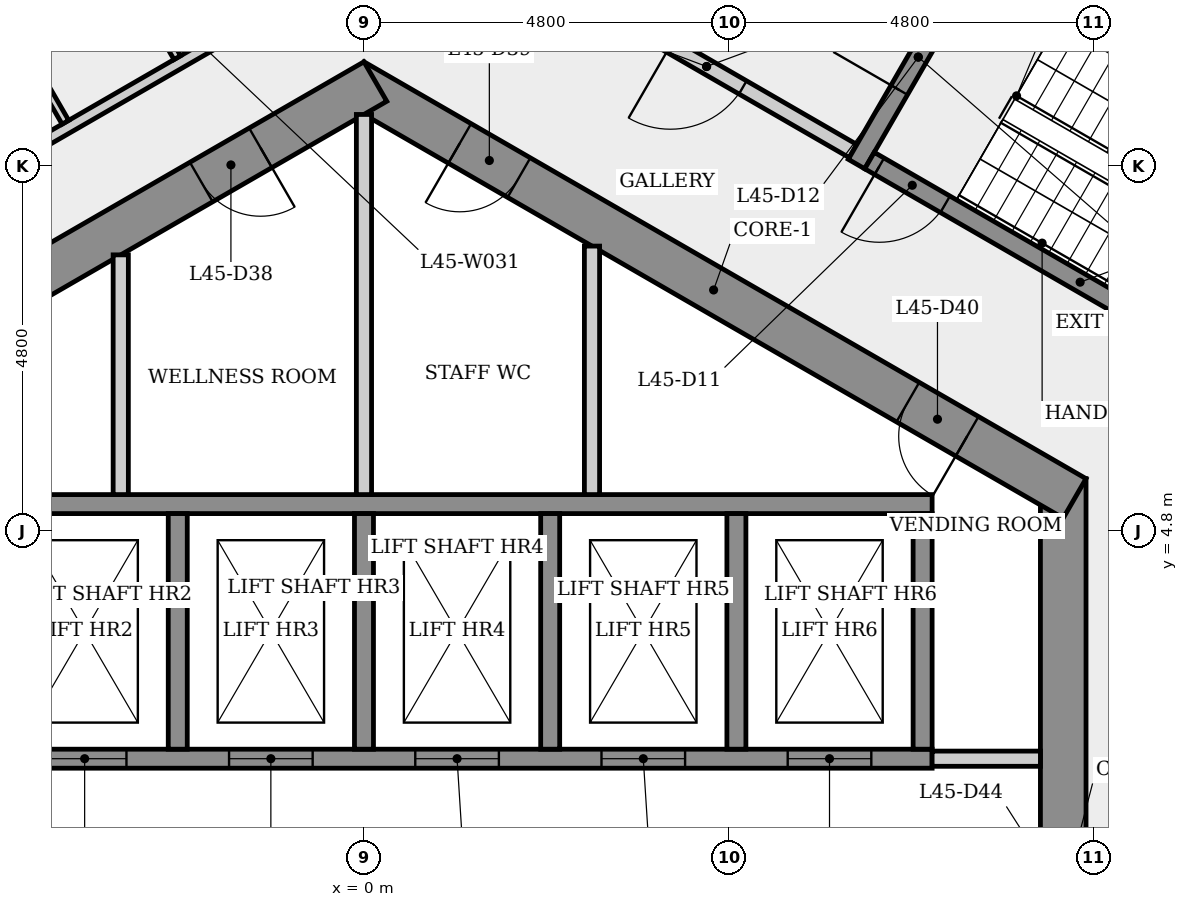
"""IFC4 building model, lengths in metres.
Left out: names, types, materials, properties, quantities, classifications, styles, units other than length and angle.
Written with IfcOpenShell. Run it as: python <this file> out.ifc"""

import sys

from ifc_helpers import new_model, si_unit, direction, frame, frame_2d, origin, place, context, subcontext, project, spatial, rectangle, extrude, element, fill, save


model = new_model("IFC4")
c1 = context("Model", 3, precision=1e-05, world=origin(), true_north=direction((0.0, 1.0)))
c2 = subcontext(c1, "Body", "Model", "MODEL_VIEW")
j1 = project(units=[si_unit("LENGTHUNIT", "METRE"), si_unit("PLANEANGLEUNIT", "RADIAN")], contexts=[c1])
p1 = place(None, origin())
s1 = spatial("IfcSite", under=j1, at=p1, CompositionType="ELEMENT")
p2 = place(p1, origin())
s2 = spatial("IfcBuilding", under=s1, at=p2, CompositionType="ELEMENT")
p3 = place(p2, frame((0.0, 0.0, 169.7)))
s3 = spatial("IfcBuildingStorey", under=s2, at=p3, CompositionType="ELEMENT", Elevation=169.7)
p4 = place(p3, frame((9.2, -5.485, 0.0), z_axis=(0.0, 0.0, 1.0), x_axis=(0.0, 1.0, 0.0)))
e1 = element("IfcWall", 1, at=p4, inside=s3, PredefinedType="SHEAR", context=c2, shape_type="SweptSolid", body=[
    extrude(rectangle(XDim=10.97, YDim=0.6, at=frame_2d((5.485, 0.0))), origin(), (0.0, 0.0, 1.0), 3.4),
])
p5 = place(p4, frame((4.685, 0.0, 0.0)))
e2 = element("IfcOpeningElement", 2, at=p5, cuts=e1, PredefinedType="OPENING", context=c2, shape_type="SweptSolid", body=[
    extrude(rectangle(XDim=1.6, YDim=2.1, at=frame_2d((0.8, 1.05))), frame((0.0, 0.31, 0.0), z_axis=(0.0, -1.0, 0.0), x_axis=(1.0, 0.0, 0.0)), (0.0, 0.0, 1.0), 0.62),
])
p6 = place(p3, frame((9.35, 5.225, 0.0), z_axis=(0.0, 0.0, 1.0), x_axis=(-0.866023993627, 0.500002442456, 0.0)))
e3 = element("IfcWall", 3, at=p6, inside=s3, PredefinedType="SHEAR", context=c2, shape_type="SweptSolid", body=[
    extrude(rectangle(XDim=10.97, YDim=0.6, at=frame_2d((5.485, 0.0))), origin(), (0.0, 0.0, 1.0), 3.4),
])
p7 = place(p6, frame((8.442, 0.0, 0.0)))
e4 = element("IfcOpeningElement", 4, at=p7, cuts=e3, PredefinedType="OPENING", context=c2, shape_type="SweptSolid", body=[
    extrude(rectangle(XDim=0.9, YDim=2.1, at=frame_2d((0.45, 1.05))), frame((0.0, 0.31, 0.0), z_axis=(0.0, -1.0, 0.0), x_axis=(1.0, 0.0, 0.0)), (0.0, 0.0, 1.0), 0.62),
])
p8 = place(p6, frame((1.634, 0.0, 0.0)))
e5 = element("IfcOpeningElement", 5, at=p8, cuts=e3, PredefinedType="OPENING", context=c2, shape_type="SweptSolid", body=[
    extrude(rectangle(XDim=0.9, YDim=2.1, at=frame_2d((0.45, 1.05))), frame((0.0, 0.31, 0.0), z_axis=(0.0, -1.0, 0.0), x_axis=(1.0, 0.0, 0.0)), (0.0, 0.0, 1.0), 0.62),
])
p9 = place(p3, frame((0.15, 10.71, 0.0), z_axis=(0.0, 0.0, 1.0), x_axis=(-0.866023993627, -0.500002442456, 0.0)))
e6 = element("IfcWall", 6, at=p9, inside=s3, PredefinedType="SHEAR", context=c2, shape_type="SweptSolid", body=[
    extrude(rectangle(XDim=10.97, YDim=0.6, at=frame_2d((5.485, 0.0))), origin(), (0.0, 0.0, 1.0), 3.4),
])
p10 = place(p9, frame((9.201, 0.0, 0.0)))
e7 = element("IfcOpeningElement", 7, at=p10, cuts=e6, PredefinedType="OPENING", context=c2, shape_type="SweptSolid", body=[
    extrude(rectangle(XDim=0.9, YDim=2.1, at=frame_2d((0.45, 1.05))), frame((0.0, 0.31, 0.0), z_axis=(0.0, -1.0, 0.0), x_axis=(1.0, 0.0, 0.0)), (0.0, 0.0, 1.0), 0.62),
])
p11 = place(p9, frame((1.744, 0.0, 0.0)))
e8 = element("IfcOpeningElement", 8, at=p11, cuts=e6, PredefinedType="OPENING", context=c2, shape_type="SweptSolid", body=[
    extrude(rectangle(XDim=0.9, YDim=2.1, at=frame_2d((0.45, 1.05))), frame((0.0, 0.31, 0.0), z_axis=(0.0, -1.0, 0.0), x_axis=(1.0, 0.0, 0.0)), (0.0, 0.0, 1.0), 0.62),
])
p12 = place(p3, frame((-9.663, 6.776, 0.0), z_axis=(0.0, 0.0, 1.0), x_axis=(0.866026375365, 0.499998317169, 0.0)))
e9 = element("IfcWall", 9, at=p12, inside=s3, PredefinedType="PARTITIONING", context=c2, shape_type="SweptSolid", body=[
    extrude(rectangle(XDim=10.036, YDim=0.15, at=frame_2d((5.018, 0.0))), origin(), (0.0, 0.0, 1.0), 3.05),
])
p13 = place(p12, frame((2.818, 0.0, 0.0)))
e10 = element("IfcOpeningElement", 10, at=p13, cuts=e9, PredefinedType="OPENING", context=c2, shape_type="SweptSolid", body=[
    extrude(rectangle(XDim=1.0, YDim=2.1, at=frame_2d((0.5, 1.05))), frame((0.0, 0.085, 0.0), z_axis=(0.0, -1.0, 0.0), x_axis=(1.0, 0.0, 0.0)), (0.0, 0.0, 1.0), 0.17),
])
p14 = place(p3, frame((-7.475, 1.8, 0.0), z_axis=(0.0, 0.0, 1.0), x_axis=(1.0, 0.0, 0.0)))
e11 = element("IfcWall", 11, at=p14, inside=s3, PredefinedType="SHEAR", context=c2, shape_type="SweptSolid", body=[
    extrude(rectangle(XDim=14.95, YDim=0.25, at=frame_2d((7.475, 0.0))), origin(), (0.0, 0.0, 1.0), 3.05),
])
p15 = place(p14, frame((0.8, 0.0, 0.0)))
e12 = element("IfcOpeningElement", 12, at=p15, cuts=e11, PredefinedType="OPENING", context=c2, shape_type="SweptSolid", body=[
    extrude(rectangle(XDim=1.1, YDim=2.1, at=frame_2d((0.55, 1.05))), frame((0.0, 0.135, 0.0), z_axis=(0.0, -1.0, 0.0), x_axis=(1.0, 0.0, 0.0)), (0.0, 0.0, 1.0), 0.27),
])
p16 = place(p14, frame((3.25, 0.0, 0.0)))
e13 = element("IfcOpeningElement", 13, at=p16, cuts=e11, PredefinedType="OPENING", context=c2, shape_type="SweptSolid", body=[
    extrude(rectangle(XDim=1.1, YDim=2.1, at=frame_2d((0.55, 1.05))), frame((0.0, 0.135, 0.0), z_axis=(0.0, -1.0, 0.0), x_axis=(1.0, 0.0, 0.0)), (0.0, 0.0, 1.0), 0.27),
])
p17 = place(p14, frame((5.7, 0.0, 0.0)))
e14 = element("IfcOpeningElement", 14, at=p17, cuts=e11, PredefinedType="OPENING", context=c2, shape_type="SweptSolid", body=[
    extrude(rectangle(XDim=1.1, YDim=2.1, at=frame_2d((0.55, 1.05))), frame((0.0, 0.135, 0.0), z_axis=(0.0, -1.0, 0.0), x_axis=(1.0, 0.0, 0.0)), (0.0, 0.0, 1.0), 0.27),
])
p18 = place(p14, frame((8.15, 0.0, 0.0)))
e15 = element("IfcOpeningElement", 15, at=p18, cuts=e11, PredefinedType="OPENING", context=c2, shape_type="SweptSolid", body=[
    extrude(rectangle(XDim=1.1, YDim=2.1, at=frame_2d((0.55, 1.05))), frame((0.0, 0.135, 0.0), z_axis=(0.0, -1.0, 0.0), x_axis=(1.0, 0.0, 0.0)), (0.0, 0.0, 1.0), 0.27),
])
p19 = place(p14, frame((10.6, 0.0, 0.0)))
e16 = element("IfcOpeningElement", 16, at=p19, cuts=e11, PredefinedType="OPENING", context=c2, shape_type="SweptSolid", body=[
    extrude(rectangle(XDim=1.1, YDim=2.1, at=frame_2d((0.55, 1.05))), frame((0.0, 0.135, 0.0), z_axis=(0.0, -1.0, 0.0), x_axis=(1.0, 0.0, 0.0)), (0.0, 0.0, 1.0), 0.27),
])
p20 = place(p14, frame((13.05, 0.0, 0.0)))
e17 = element("IfcOpeningElement", 17, at=p20, cuts=e11, PredefinedType="OPENING", context=c2, shape_type="SweptSolid", body=[
    extrude(rectangle(XDim=1.1, YDim=2.1, at=frame_2d((0.55, 1.05))), frame((0.0, 0.135, 0.0), z_axis=(0.0, -1.0, 0.0), x_axis=(1.0, 0.0, 0.0)), (0.0, 0.0, 1.0), 0.27),
])
p21 = place(p3, frame((-7.225, 5.15, 0.0), z_axis=(0.0, 0.0, 1.0), x_axis=(1.0, 0.0, 0.0)))
e18 = element("IfcWall", 18, at=p21, inside=s3, PredefinedType="SHEAR", context=c2, shape_type="SweptSolid", body=[
    extrude(rectangle(XDim=14.7, YDim=0.25, at=frame_2d((7.35, 0.0))), origin(), (0.0, 0.0, 1.0), 3.05),
])
p22 = place(p3, frame((-3.928, 10.174, 0.0), z_axis=(0.0, 0.0, 1.0), x_axis=(-0.500011399757, 0.866018822032, 0.0)))
e19 = element("IfcWall", 19, at=p22, inside=s3, PredefinedType="PARTITIONING", context=c2, shape_type="SweptSolid", body=[
    extrude(rectangle(XDim=7.411, YDim=0.1, at=frame_2d((3.706, 0.0))), origin(), (0.0, 0.0, 1.0), 3.05),
])
p23 = place(p3, frame((-3.644, 13.081, 0.0), z_axis=(0.0, 0.0, 1.0), x_axis=(0.499986429846, -0.866033238375, 0.0)))
e20 = element("IfcWall", 20, at=p23, inside=s3, PredefinedType="PARTITIONING", context=c2, shape_type="SweptSolid", body=[
    extrude(rectangle(XDim=2.375, YDim=0.1, at=frame_2d((1.188, 0.0))), origin(), (0.0, 0.0, 1.0), 3.05),
])
p24 = place(p23, frame((0.812, 0.0, 0.0)))
e21 = element("IfcOpeningElement", 21, at=p24, cuts=e20, PredefinedType="OPENING", context=c2, shape_type="SweptSolid", body=[
    extrude(rectangle(XDim=0.8, YDim=2.1, at=frame_2d((0.4, 1.05))), frame((0.0, 0.06, 0.0), z_axis=(0.0, -1.0, 0.0), x_axis=(1.0, 0.0, 0.0)), (0.0, 0.0, 1.0), 0.12),
])
p25 = place(p3, frame((-3.2, 8.429, 0.0), z_axis=(0.0, 0.0, 1.0), x_axis=(0.0, -1.0, 0.0)))
e22 = element("IfcWall", 22, at=p25, inside=s3, PredefinedType="PARTITIONING", context=c2, shape_type="SweptSolid", body=[
    extrude(rectangle(XDim=3.154, YDim=0.2, at=frame_2d((1.577, 0.0))), origin(), (0.0, 0.0, 1.0), 3.05),
])
for number, where, z_axis, x_axis in (
    (23, (-2.45, 5.025, 0.0), (0.0, 0.0, 1.0), (0.0, -1.0, 0.0)),
    (24, (0.0, 5.025, 0.0), (0.0, 0.0, 1.0), (0.0, -1.0, 0.0)),
):
    element("IfcWall", number, at=place(p3, frame(where, z_axis=z_axis, x_axis=x_axis)), inside=s3, PredefinedType="SHEAR", context=c2, shape_type="SweptSolid", body=[
        extrude(rectangle(XDim=3.1, YDim=0.25, at=frame_2d((1.55, 0.0))), origin(), (0.0, 0.0, 1.0), 3.4),
    ])
p26 = place(p3, frame((0.0, 10.277, 0.0), z_axis=(0.0, 0.0, 1.0), x_axis=(0.0, -1.0, 0.0)))
e25 = element("IfcWall", 25, at=p26, inside=s3, PredefinedType="PARTITIONING", context=c2, shape_type="SweptSolid", body=[
    extrude(rectangle(XDim=5.002, YDim=0.2, at=frame_2d((2.501, 0.0))), origin(), (0.0, 0.0, 1.0), 3.05),
])
p27 = place(p3, frame((2.45, 5.025, 0.0), z_axis=(0.0, 0.0, 1.0), x_axis=(0.0, -1.0, 0.0)))
e26 = element("IfcWall", 26, at=p27, inside=s3, PredefinedType="SHEAR", context=c2, shape_type="SweptSolid", body=[
    extrude(rectangle(XDim=3.1, YDim=0.25, at=frame_2d((1.55, 0.0))), origin(), (0.0, 0.0, 1.0), 3.4),
])
p28 = place(p3, frame((3.0, 8.545, 0.0), z_axis=(0.0, 0.0, 1.0), x_axis=(0.0, -1.0, 0.0)))
e27 = element("IfcWall", 27, at=p28, inside=s3, PredefinedType="PARTITIONING", context=c2, shape_type="SweptSolid", body=[
    extrude(rectangle(XDim=3.27, YDim=0.2, at=frame_2d((1.635, 0.0))), origin(), (0.0, 0.0, 1.0), 3.05),
])
p29 = place(p3, frame((4.9, 5.025, 0.0), z_axis=(0.0, 0.0, 1.0), x_axis=(0.0, -1.0, 0.0)))
e28 = element("IfcWall", 28, at=p29, inside=s3, PredefinedType="SHEAR", context=c2, shape_type="SweptSolid", body=[
    extrude(rectangle(XDim=3.1, YDim=0.25, at=frame_2d((1.55, 0.0))), origin(), (0.0, 0.0, 1.0), 3.4),
])
p30 = place(p3, frame((6.435, 9.795, 0.0), z_axis=(0.0, 0.0, 1.0), x_axis=(-0.866012907634, 0.500021643343, 0.0)))
e29 = element("IfcWall", 29, at=p30, inside=s3, PredefinedType="PARTITIONING", context=c2, shape_type="SweptSolid", body=[
    extrude(rectangle(XDim=4.45, YDim=0.2, at=frame_2d((2.225, 0.0))), origin(), (0.0, 0.0, 1.0), 3.05),
])
p31 = place(p30, frame((1.675, 0.0, 0.0)))
e30 = element("IfcOpeningElement", 30, at=p31, cuts=e29, PredefinedType="OPENING", context=c2, shape_type="SweptSolid", body=[
    extrude(rectangle(XDim=1.1, YDim=2.1, at=frame_2d((0.55, 1.05))), frame((0.0, 0.11, 0.0), z_axis=(0.0, -1.0, 0.0), x_axis=(1.0, 0.0, 0.0)), (0.0, 0.0, 1.0), 0.22),
])
p32 = place(p3, frame((6.48, 9.624, 0.0), z_axis=(0.0, 0.0, 1.0), x_axis=(0.500017246033, 0.866015446554, 0.0)))
e31 = element("IfcWall", 31, at=p32, inside=s3, PredefinedType="SHEAR", context=c2, shape_type="SweptSolid", body=[
    extrude(rectangle(XDim=3.25, YDim=0.25, at=frame_2d((1.625, 0.0))), origin(), (0.0, 0.0, 1.0), 3.05),
])
p33 = place(p32, frame((1.125, 0.0, 0.0)))
e32 = element("IfcOpeningElement", 32, at=p33, cuts=e31, PredefinedType="OPENING", context=c2, shape_type="SweptSolid", body=[
    extrude(rectangle(XDim=1.0, YDim=2.1, at=frame_2d((0.5, 1.05))), frame((0.0, 0.135, 0.0), z_axis=(0.0, -1.0, 0.0), x_axis=(1.0, 0.0, 0.0)), (0.0, 0.0, 1.0), 0.27),
])
p34 = place(p3, frame((7.475, 1.8, 0.0), z_axis=(0.0, 0.0, 1.0), x_axis=(1.0, 0.0, 0.0)))
e33 = element("IfcWall", 33, at=p34, inside=s3, PredefinedType="PARTITIONING", context=c2, shape_type="SweptSolid", body=[
    extrude(rectangle(XDim=1.425, YDim=0.2, at=frame_2d((0.712, 0.0))), origin(), (0.0, 0.0, 1.0), 3.05),
])
p35 = place(p3, frame((7.35, 5.025, 0.0), z_axis=(0.0, 0.0, 1.0), x_axis=(0.0, -1.0, 0.0)))
e34 = element("IfcWall", 34, at=p35, inside=s3, PredefinedType="SHEAR", context=c2, shape_type="SweptSolid", body=[
    extrude(rectangle(XDim=3.1, YDim=0.25, at=frame_2d((1.55, 0.0))), origin(), (0.0, 0.0, 1.0), 3.4),
])
p36 = place(p3, frame((8.151, 12.268, 0.0), z_axis=(0.0, 0.0, 1.0), x_axis=(0.866025499775, -0.499999833739, 0.0)))
e35 = element("IfcWall", 35, at=p36, inside=s3, PredefinedType="SHEAR", context=c2, shape_type="SweptSolid", body=[
    extrude(rectangle(XDim=6.4, YDim=0.25, at=frame_2d((3.2, 0.0))), origin(), (0.0, 0.0, 1.0), 3.05),
])
p37 = place(p3, frame((12.194, 6.47, 0.0), z_axis=(0.0, 0.0, 1.0), x_axis=(-0.866025499775, 0.499999833739, 0.0)))
e36 = element("IfcWall", 36, at=p37, inside=s3, PredefinedType="SHEAR", context=c2, shape_type="SweptSolid", body=[
    extrude(rectangle(XDim=6.4, YDim=0.25, at=frame_2d((3.2, 0.0))), origin(), (0.0, 0.0, 1.0), 3.05),
])
p38 = place(p37, frame((5.25, 0.0, 0.0)))
e37 = element("IfcOpeningElement", 37, at=p38, cuts=e36, PredefinedType="OPENING", context=c2, shape_type="SweptSolid", body=[
    extrude(rectangle(XDim=1.0, YDim=2.1, at=frame_2d((0.5, 1.05))), frame((0.0, 0.135, 0.0), z_axis=(0.0, -1.0, 0.0), x_axis=(1.0, 0.0, 0.0)), (0.0, 0.0, 1.0), 0.27),
])
p39 = place(p16, origin())
e38 = element("IfcDoor", 38, at=p39, inside=s3, OperationType="SLIDING_TO_LEFT", PredefinedType="DOOR", context=c2, shape_type="SweptSolid", body=[
    extrude(rectangle(XDim=1.1, YDim=2.1, at=frame_2d((0.55, 1.05))), frame((0.0, 0.025, 0.0), z_axis=(0.0, -1.0, 0.0), x_axis=(1.0, 0.0, 0.0)), (0.0, 0.0, 1.0), 0.05),
])
fill(e13, e38)
p40 = place(p17, origin())
e39 = element("IfcDoor", 39, at=p40, inside=s3, OperationType="SLIDING_TO_LEFT", PredefinedType="DOOR", context=c2, shape_type="SweptSolid", body=[
    extrude(rectangle(XDim=1.1, YDim=2.1, at=frame_2d((0.55, 1.05))), frame((0.0, 0.025, 0.0), z_axis=(0.0, -1.0, 0.0), x_axis=(1.0, 0.0, 0.0)), (0.0, 0.0, 1.0), 0.05),
])
fill(e14, e39)
p41 = place(p18, origin())
e40 = element("IfcDoor", 40, at=p41, inside=s3, OperationType="SLIDING_TO_LEFT", PredefinedType="DOOR", context=c2, shape_type="SweptSolid", body=[
    extrude(rectangle(XDim=1.1, YDim=2.1, at=frame_2d((0.55, 1.05))), frame((0.0, 0.025, 0.0), z_axis=(0.0, -1.0, 0.0), x_axis=(1.0, 0.0, 0.0)), (0.0, 0.0, 1.0), 0.05),
])
fill(e15, e40)
p42 = place(p19, origin())
e41 = element("IfcDoor", 41, at=p42, inside=s3, OperationType="SLIDING_TO_LEFT", PredefinedType="DOOR", context=c2, shape_type="SweptSolid", body=[
    extrude(rectangle(XDim=1.1, YDim=2.1, at=frame_2d((0.55, 1.05))), frame((0.0, 0.025, 0.0), z_axis=(0.0, -1.0, 0.0), x_axis=(1.0, 0.0, 0.0)), (0.0, 0.0, 1.0), 0.05),
])
fill(e16, e41)
p43 = place(p20, origin())
e42 = element("IfcDoor", 42, at=p43, inside=s3, OperationType="SLIDING_TO_LEFT", PredefinedType="DOOR", context=c2, shape_type="SweptSolid", body=[
    extrude(rectangle(XDim=1.1, YDim=2.1, at=frame_2d((0.55, 1.05))), frame((0.0, 0.025, 0.0), z_axis=(0.0, -1.0, 0.0), x_axis=(1.0, 0.0, 0.0)), (0.0, 0.0, 1.0), 0.05),
])
fill(e17, e42)
p44 = place(p38, origin())
e43 = element("IfcDoor", 43, at=p44, inside=s3, OperationType="SINGLE_SWING_RIGHT", PredefinedType="DOOR", context=c2, shape_type="SweptSolid", body=[
    extrude(rectangle(XDim=1.0, YDim=2.1, at=frame_2d((0.5, 1.05))), frame((0.0, 0.025, 0.0), z_axis=(0.0, -1.0, 0.0), x_axis=(1.0, 0.0, 0.0)), (0.0, 0.0, 1.0), 0.05),
])
fill(e37, e43)
p45 = place(p33, origin())
e44 = element("IfcDoor", 44, at=p45, inside=s3, OperationType="SINGLE_SWING_LEFT", PredefinedType="DOOR", context=c2, shape_type="SweptSolid", body=[
    extrude(rectangle(XDim=1.0, YDim=2.1, at=frame_2d((0.5, 1.05))), frame((0.0, 0.025, 0.0), z_axis=(0.0, -1.0, 0.0), x_axis=(1.0, 0.0, 0.0)), (0.0, 0.0, 1.0), 0.05),
])
fill(e32, e44)
p46 = place(p31, origin())
e45 = element("IfcDoor", 45, at=p46, inside=s3, OperationType="SINGLE_SWING_RIGHT", PredefinedType="DOOR", context=c2, shape_type="SweptSolid", body=[
    extrude(rectangle(XDim=1.1, YDim=2.1, at=frame_2d((0.55, 1.05))), frame((0.0, 0.025, 0.0), z_axis=(0.0, -1.0, 0.0), x_axis=(1.0, 0.0, 0.0)), (0.0, 0.0, 1.0), 0.05),
])
fill(e30, e45)
p47 = place(p11, origin())
e46 = element("IfcDoor", 46, at=p47, inside=s3, OperationType="SINGLE_SWING_LEFT", PredefinedType="DOOR", context=c2, shape_type="SweptSolid", body=[
    extrude(rectangle(XDim=0.9, YDim=2.1, at=frame_2d((0.45, 1.05))), frame((0.0, 0.025, 0.0), z_axis=(0.0, -1.0, 0.0), x_axis=(1.0, 0.0, 0.0)), (0.0, 0.0, 1.0), 0.05),
])
fill(e8, e46)
p48 = place(p7, origin())
e47 = element("IfcDoor", 47, at=p48, inside=s3, OperationType="SINGLE_SWING_RIGHT", PredefinedType="DOOR", context=c2, shape_type="SweptSolid", body=[
    extrude(rectangle(XDim=0.9, YDim=2.1, at=frame_2d((0.45, 1.05))), frame((0.0, 0.025, 0.0), z_axis=(0.0, -1.0, 0.0), x_axis=(1.0, 0.0, 0.0)), (0.0, 0.0, 1.0), 0.05),
])
fill(e4, e47)
p49 = place(p8, origin())
e48 = element("IfcDoor", 48, at=p49, inside=s3, OperationType="SINGLE_SWING_LEFT", PredefinedType="DOOR", context=c2, shape_type="SweptSolid", body=[
    extrude(rectangle(XDim=0.9, YDim=2.1, at=frame_2d((0.45, 1.05))), frame((0.0, 0.025, 0.0), z_axis=(0.0, -1.0, 0.0), x_axis=(1.0, 0.0, 0.0)), (0.0, 0.0, 1.0), 0.05),
])
fill(e5, e48)
save(model, sys.argv[1])
